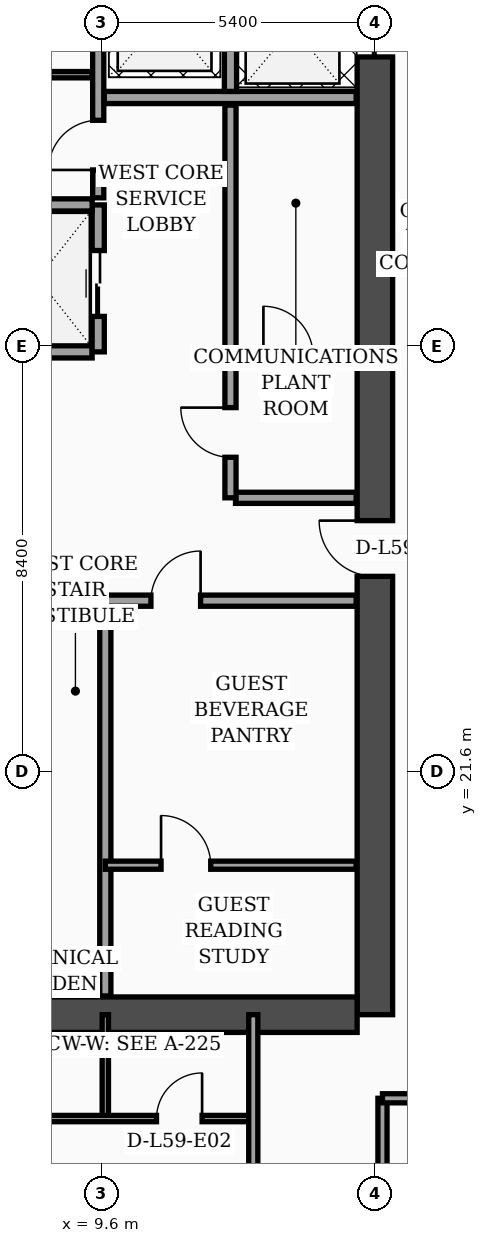
"""IFC4 building model, lengths in metres.
Left out: names, types, materials, properties, quantities, classifications, styles, units other than length and angle.
Written with IfcOpenShell. Run it as: python <this file> out.ifc"""

import sys

from ifc_helpers import new_model, si_unit, direction, frame, frame_2d, origin, place, context, subcontext, project, spatial, rectangle, extrude, element, fill, save


model = new_model("IFC4")
c1 = context("Model", 3, precision=1e-05, world=origin(), true_north=direction((0.0, 1.0)))
c2 = subcontext(c1, "Body", "Model", "MODEL_VIEW")
j1 = project(units=[si_unit("LENGTHUNIT", "METRE"), si_unit("PLANEANGLEUNIT", "RADIAN")], contexts=[c1])
p1 = place(None, origin())
s1 = spatial("IfcSite", under=j1, at=p1, CompositionType="ELEMENT")
p2 = place(p1, origin())
s2 = spatial("IfcBuilding", under=s1, at=p2, CompositionType="ELEMENT")
p3 = place(p2, frame((0.0, 0.0, 239.3)))
s3 = spatial("IfcBuildingStorey", under=s2, at=p3, CompositionType="ELEMENT", Elevation=239.3)
p4 = place(p3, frame((15.0, 16.8, 0.0), z_axis=(0.0, 0.0, 1.0), x_axis=(0.0, 1.0, 0.0)))
e1 = element("IfcWall", 1, at=p4, inside=s3, PredefinedType="SHEAR", context=c2, shape_type="SweptSolid", body=[
    extrude(rectangle(XDim=21.6, YDim=0.7, at=frame_2d((10.8, 0.0))), origin(), (0.0, 0.0, 1.0), 4.05),
])
p5 = place(p4, frame((8.65, 0.0, 0.0)))
e2 = element("IfcOpeningElement", 2, at=p5, cuts=e1, PredefinedType="OPENING", context=c2, shape_type="SweptSolid", body=[
    extrude(rectangle(XDim=1.1, YDim=2.2, at=frame_2d((0.55, 1.1))), frame((0.0, 0.36, 0.0), z_axis=(0.0, -1.0, 0.0), x_axis=(1.0, 0.0, 0.0)), (0.0, 0.0, 1.0), 0.72),
])
p6 = place(p4, frame((18.9, 0.0, 0.0)))
e3 = element("IfcOpeningElement", 3, at=p6, cuts=e1, PredefinedType="OPENING", context=c2, shape_type="SweptSolid", body=[
    extrude(rectangle(XDim=1.1, YDim=2.2, at=frame_2d((0.55, 1.1))), frame((0.0, 0.36, 0.0), z_axis=(0.0, -1.0, 0.0), x_axis=(1.0, 0.0, 0.0)), (0.0, 0.0, 1.0), 0.72),
])
p7 = place(p3, frame((4.55, 16.8, 0.0), z_axis=(0.0, 0.0, 1.0), x_axis=(1.0, 0.0, 0.0)))
e4 = element("IfcWall", 4, at=p7, inside=s3, PredefinedType="SHEAR", context=c2, shape_type="SweptSolid", body=[
    extrude(rectangle(XDim=10.1, YDim=0.7, at=frame_2d((5.05, 0.0))), origin(), (0.0, 0.0, 1.0), 4.05),
])
p8 = place(p3, frame((4.57, 29.88, 0.0), z_axis=(0.0, 0.0, 1.0), x_axis=(1.0, 0.0, 0.0)))
e5 = element("IfcWall", 5, at=p8, inside=s3, PredefinedType="SOLIDWALL", context=c2, shape_type="SweptSolid", body=[
    extrude(rectangle(XDim=4.85, YDim=0.24, at=frame_2d((2.425, 0.0))), origin(), (0.0, 0.0, 1.0), 4.05),
])
p9 = place(p8, frame((0.45, 0.0, 0.0)))
e6 = element("IfcOpeningElement", 6, at=p9, cuts=e5, PredefinedType="OPENING", context=c2, shape_type="SweptSolid", body=[
    extrude(rectangle(XDim=1.3, YDim=2.35, at=frame_2d((0.65, 1.175))), frame((0.0, 0.13, 0.0), z_axis=(0.0, -1.0, 0.0), x_axis=(1.0, 0.0, 0.0)), (0.0, 0.0, 1.0), 0.26),
])
p10 = place(p3, frame((9.54, 29.88, 0.0), z_axis=(0.0, 0.0, 1.0), x_axis=(0.0, 1.0, 0.0)))
e7 = element("IfcWall", 7, at=p10, inside=s3, PredefinedType="SOLIDWALL", context=c2, shape_type="SweptSolid", body=[
    extrude(rectangle(XDim=2.9, YDim=0.24, at=frame_2d((1.45, 0.0))), origin(), (0.0, 0.0, 1.0), 4.05),
])
p11 = place(p10, frame((0.7, 0.0, 0.0)))
e8 = element("IfcOpeningElement", 8, at=p11, cuts=e7, PredefinedType="OPENING", context=c2, shape_type="SweptSolid", body=[
    extrude(rectangle(XDim=1.3, YDim=2.35, at=frame_2d((0.65, 1.175))), frame((0.0, 0.13, 0.0), z_axis=(0.0, -1.0, 0.0), x_axis=(1.0, 0.0, 0.0)), (0.0, 0.0, 1.0), 0.26),
])
p12 = place(p3, frame((4.57, 32.78, 0.0), z_axis=(0.0, 0.0, 1.0), x_axis=(1.0, 0.0, 0.0)))
e9 = element("IfcWall", 9, at=p12, inside=s3, PredefinedType="SOLIDWALL", context=c2, shape_type="SweptSolid", body=[
    extrude(rectangle(XDim=4.85, YDim=0.24, at=frame_2d((2.425, 0.0))), origin(), (0.0, 0.0, 1.0), 3.7),
])
p13 = place(p3, frame((9.68, 17.17, 0.0), z_axis=(0.0, 0.0, 1.0), x_axis=(0.0, 1.0, 0.0)))
e10 = element("IfcWall", 10, at=p13, inside=s3, PredefinedType="SOLIDWALL", context=c2, shape_type="SweptSolid", body=[
    extrude(rectangle(XDim=7.83, YDim=0.22, at=frame_2d((3.915, 0.0))), origin(), (0.0, 0.0, 1.0), 4.05),
])
p14 = place(p3, frame((7.05, 35.35, 0.0), z_axis=(0.0, 0.0, 1.0), x_axis=(1.0, 0.0, 0.0)))
e11 = element("IfcWall", 11, at=p14, inside=s3, PredefinedType="PARTITIONING", context=c2, shape_type="SweptSolid", body=[
    extrude(rectangle(XDim=2.37, YDim=0.125, at=frame_2d((1.185, 0.0))), origin(), (0.0, 0.0, 1.0), 4.05),
])
p15 = place(p14, frame((0.55, 0.0, 0.0)))
e12 = element("IfcOpeningElement", 12, at=p15, cuts=e11, PredefinedType="OPENING", context=c2, shape_type="SweptSolid", body=[
    extrude(rectangle(XDim=0.98, YDim=2.15, at=frame_2d((0.49, 1.075))), frame((0.0, 0.073, 0.0), z_axis=(0.0, -1.0, 0.0), x_axis=(1.0, 0.0, 0.0)), (0.0, 0.0, 1.0), 0.145),
])
p16 = place(p3, frame((9.54, 32.92, 0.0), z_axis=(0.0, 0.0, 1.0), x_axis=(0.0, 1.0, 0.0)))
e13 = element("IfcWall", 13, at=p16, inside=s3, PredefinedType="SOLIDWALL", context=c2, shape_type="SweptSolid", body=[
    extrude(rectangle(XDim=5.11, YDim=0.22, at=frame_2d((2.555, 0.0))), origin(), (0.0, 0.0, 1.0), 4.05),
])
p17 = place(p16, frame((0.55, 0.0, 0.0)))
e14 = element("IfcOpeningElement", 14, at=p17, cuts=e13, PredefinedType="OPENING", context=c2, shape_type="SweptSolid", body=[
    extrude(rectangle(XDim=0.98, YDim=2.15, at=frame_2d((0.49, 1.075))), frame((0.0, 0.12, 0.0), z_axis=(0.0, -1.0, 0.0), x_axis=(1.0, 0.0, 0.0)), (0.0, 0.0, 1.0), 0.24),
])
p18 = place(p3, frame((9.68, 19.75, 0.0), z_axis=(0.0, 0.0, 1.0), x_axis=(1.0, 0.0, 0.0)))
e15 = element("IfcWall", 15, at=p18, inside=s3, PredefinedType="PARTITIONING", context=c2, shape_type="SweptSolid", body=[
    extrude(rectangle(XDim=4.95, YDim=0.16, at=frame_2d((2.475, 0.0))), origin(), (0.0, 0.0, 1.0), 4.05),
])
p19 = place(p18, frame((1.1, 0.0, 0.0)))
e16 = element("IfcOpeningElement", 16, at=p19, cuts=e15, PredefinedType="OPENING", context=c2, shape_type="SweptSolid", body=[
    extrude(rectangle(XDim=0.98, YDim=2.15, at=frame_2d((0.49, 1.075))), frame((0.0, 0.09, 0.0), z_axis=(0.0, -1.0, 0.0), x_axis=(1.0, 0.0, 0.0)), (0.0, 0.0, 1.0), 0.18),
])
p20 = place(p3, frame((9.68, 24.97, 0.0), z_axis=(0.0, 0.0, 1.0), x_axis=(1.0, 0.0, 0.0)))
e17 = element("IfcWall", 17, at=p20, inside=s3, PredefinedType="SOLIDWALL", context=c2, shape_type="SweptSolid", body=[
    extrude(rectangle(XDim=4.95, YDim=0.22, at=frame_2d((2.475, 0.0))), origin(), (0.0, 0.0, 1.0), 3.5),
])
p21 = place(p20, frame((0.9, 0.0, 0.0)))
e18 = element("IfcOpeningElement", 18, at=p21, cuts=e17, PredefinedType="OPENING", context=c2, shape_type="SweptSolid", body=[
    extrude(rectangle(XDim=0.98, YDim=2.15, at=frame_2d((0.49, 1.075))), frame((0.0, 0.12, 0.0), z_axis=(0.0, -1.0, 0.0), x_axis=(1.0, 0.0, 0.0)), (0.0, 0.0, 1.0), 0.24),
])
p22 = place(p3, frame((12.25, 27.0, 0.0), z_axis=(0.0, 0.0, 1.0), x_axis=(1.0, 0.0, 0.0)))
e19 = element("IfcWall", 19, at=p22, inside=s3, PredefinedType="SOLIDWALL", context=c2, shape_type="SweptSolid", body=[
    extrude(rectangle(XDim=2.38, YDim=0.22, at=frame_2d((1.19, 0.0))), origin(), (0.0, 0.0, 1.0), 4.05),
])
p23 = place(p3, frame((12.15, 27.0, 0.0), z_axis=(0.0, 0.0, 1.0), x_axis=(0.0, 1.0, 0.0)))
e20 = element("IfcWall", 20, at=p23, inside=s3, PredefinedType="SOLIDWALL", context=c2, shape_type="SweptSolid", body=[
    extrude(rectangle(XDim=7.75, YDim=0.22, at=frame_2d((3.875, 0.0))), origin(), (0.0, 0.0, 1.0), 4.05),
])
p24 = place(p23, frame((0.8, 0.0, 0.0)))
e21 = element("IfcOpeningElement", 21, at=p24, cuts=e20, PredefinedType="OPENING", context=c2, shape_type="SweptSolid", body=[
    extrude(rectangle(XDim=0.98, YDim=2.15, at=frame_2d((0.49, 1.075))), frame((0.0, 0.12, 0.0), z_axis=(0.0, -1.0, 0.0), x_axis=(1.0, 0.0, 0.0)), (0.0, 0.0, 1.0), 0.24),
])
p25 = place(p3, frame((12.25, 29.8, 0.0), z_axis=(0.0, 0.0, 1.0), x_axis=(1.0, 0.0, 0.0)))
e22 = element("IfcWall", 22, at=p25, inside=s3, PredefinedType="PARTITIONING", context=c2, shape_type="SweptSolid", body=[
    extrude(rectangle(XDim=2.38, YDim=0.16, at=frame_2d((1.19, 0.0))), origin(), (0.0, 0.0, 1.0), 4.05),
])
p26 = place(p25, frame((0.55, 0.0, 0.0)))
e23 = element("IfcOpeningElement", 23, at=p26, cuts=e22, PredefinedType="OPENING", context=c2, shape_type="SweptSolid", body=[
    extrude(rectangle(XDim=0.98, YDim=2.15, at=frame_2d((0.49, 1.075))), frame((0.0, 0.09, 0.0), z_axis=(0.0, -1.0, 0.0), x_axis=(1.0, 0.0, 0.0)), (0.0, 0.0, 1.0), 0.18),
])
p27 = place(p3, frame((9.66, 34.9, 0.0), z_axis=(0.0, 0.0, 1.0), x_axis=(1.0, 0.0, 0.0)))
e24 = element("IfcWall", 24, at=p27, inside=s3, PredefinedType="SOLIDWALL", context=c2, shape_type="SweptSolid", body=[
    extrude(rectangle(XDim=4.97, YDim=0.24, at=frame_2d((2.485, 0.0))), origin(), (0.0, 0.0, 1.0), 4.05),
])
p28 = place(p3, frame((12.15, 35.02, 0.0), z_axis=(0.0, 0.0, 1.0), x_axis=(0.0, 1.0, 0.0)))
e25 = element("IfcWall", 25, at=p28, inside=s3, PredefinedType="SOLIDWALL", context=c2, shape_type="SweptSolid", body=[
    extrude(rectangle(XDim=3.01, YDim=0.24, at=frame_2d((1.505, 0.0))), origin(), (0.0, 0.0, 1.0), 4.05),
])
p29 = place(p3, frame((9.68, 14.75, 0.0), z_axis=(0.0, 0.0, 1.0), x_axis=(0.0, 1.0, 0.0)))
e26 = element("IfcWall", 26, at=p29, inside=s3, PredefinedType="PARTITIONING", context=c2, shape_type="SweptSolid", body=[
    extrude(rectangle(XDim=2.05, YDim=0.125, at=frame_2d((1.025, 0.0))), origin(), (0.0, 0.0, 1.0), 4.05),
])
p30 = place(p3, frame((0.08, 14.75, 0.0), z_axis=(0.0, 0.0, 1.0), x_axis=(1.0, 0.0, 0.0)))
e27 = element("IfcWall", 27, at=p30, inside=s3, PredefinedType="PARTITIONING", context=c2, shape_type="SweptSolid", body=[
    extrude(rectangle(XDim=12.52, YDim=0.125, at=frame_2d((6.26, 0.0))), origin(), (0.0, 0.0, 1.0), 3.5),
])
p31 = place(p30, frame((4.32, 0.0, 0.0)))
e28 = element("IfcOpeningElement", 28, at=p31, cuts=e27, PredefinedType="OPENING", context=c2, shape_type="SweptSolid", body=[
    extrude(rectangle(XDim=0.96, YDim=2.2, at=frame_2d((0.48, 1.1))), frame((0.0, 0.073, 0.0), z_axis=(0.0, -1.0, 0.0), x_axis=(1.0, 0.0, 0.0)), (0.0, 0.0, 1.0), 0.145),
])
p32 = place(p30, frame((10.61, 0.0, 0.0)))
e29 = element("IfcOpeningElement", 29, at=p32, cuts=e27, PredefinedType="OPENING", context=c2, shape_type="SweptSolid", body=[
    extrude(rectangle(XDim=0.9, YDim=2.15, at=frame_2d((0.45, 1.075))), frame((0.0, 0.073, 0.0), z_axis=(0.0, -1.0, 0.0), x_axis=(1.0, 0.0, 0.0)), (0.0, 0.0, 1.0), 0.145),
])
p33 = place(p3, frame((12.6, 2.44, 0.0), z_axis=(0.0, 0.0, 1.0), x_axis=(0.0, 1.0, 0.0)))
e30 = element("IfcWall", 30, at=p33, inside=s3, PredefinedType="PARTITIONING", context=c2, shape_type="SweptSolid", body=[
    extrude(rectangle(XDim=14.36, YDim=0.18, at=frame_2d((7.18, 0.0))), origin(), (0.0, 0.0, 1.0), 2.35),
])
p34 = place(p33, frame((3.01, 0.0, 0.0)))
e31 = element("IfcOpeningElement", 31, at=p34, cuts=e30, PredefinedType="OPENING", context=c2, shape_type="SweptSolid", body=[
    extrude(rectangle(XDim=1.02, YDim=2.2, at=frame_2d((0.51, 1.1))), frame((0.0, 0.1, 0.0), z_axis=(0.0, -1.0, 0.0), x_axis=(1.0, 0.0, 0.0)), (0.0, 0.0, 1.0), 0.2),
])
p35 = place(p33, frame((9.35, 0.0, 0.0)))
e32 = element("IfcOpeningElement", 32, at=p35, cuts=e30, PredefinedType="OPENING", context=c2, shape_type="SweptSolid", body=[
    extrude(rectangle(XDim=1.02, YDim=2.2, at=frame_2d((0.51, 1.1))), frame((0.0, 0.1, 0.0), z_axis=(0.0, -1.0, 0.0), x_axis=(1.0, 0.0, 0.0)), (0.0, 0.0, 1.0), 0.2),
])
p36 = place(p3, frame((15.15, 2.44, 0.0), z_axis=(0.0, 0.0, 1.0), x_axis=(0.0, 1.0, 0.0)))
e33 = element("IfcWall", 33, at=p36, inside=s3, PredefinedType="PARTITIONING", context=c2, shape_type="SweptSolid", body=[
    extrude(rectangle(XDim=12.71, YDim=0.18, at=frame_2d((6.355, 0.0))), origin(), (0.0, 0.0, 1.0), 2.35),
])
p37 = place(p3, frame((15.15, 15.15, 0.0), z_axis=(0.0, 0.0, 1.0), x_axis=(1.0, 0.0, 0.0)))
e34 = element("IfcWall", 34, at=p37, inside=s3, PredefinedType="PARTITIONING", context=c2, shape_type="SweptSolid", body=[
    extrude(rectangle(XDim=6.45, YDim=0.18, at=frame_2d((3.225, 0.0))), origin(), (0.0, 0.0, 1.0), 2.35),
])
p38 = place(p37, frame((1.74, 0.0, 0.0)))
e35 = element("IfcOpeningElement", 35, at=p38, cuts=e34, PredefinedType="OPENING", context=c2, shape_type="SweptSolid", body=[
    extrude(rectangle(XDim=1.02, YDim=2.2, at=frame_2d((0.51, 1.1))), frame((0.0, 0.1, 0.0), z_axis=(0.0, -1.0, 0.0), x_axis=(1.0, 0.0, 0.0)), (0.0, 0.0, 1.0), 0.2),
])
p39 = place(p11, origin())
e36 = element("IfcDoor", 36, at=p39, inside=s3, OperationType="DOUBLE_DOOR_SLIDING", PredefinedType="DOOR", context=c2, shape_type="SweptSolid", body=[
    extrude(rectangle(XDim=1.3, YDim=2.35, at=frame_2d((0.65, 1.175))), frame((0.0, 0.025, 0.0), z_axis=(0.0, -1.0, 0.0), x_axis=(1.0, 0.0, 0.0)), (0.0, 0.0, 1.0), 0.05),
])
fill(e8, e36)
p40 = place(p17, origin())
e37 = element("IfcDoor", 37, at=p40, inside=s3, OperationType="SINGLE_SWING_LEFT", PredefinedType="DOOR", context=c2, shape_type="SweptSolid", body=[
    extrude(rectangle(XDim=0.98, YDim=2.15, at=frame_2d((0.49, 1.075))), frame((0.0, 0.025, 0.0), z_axis=(0.0, -1.0, 0.0), x_axis=(1.0, 0.0, 0.0)), (0.0, 0.0, 1.0), 0.05),
])
fill(e14, e37)
p41 = place(p19, origin())
e38 = element("IfcDoor", 38, at=p41, inside=s3, OperationType="SINGLE_SWING_LEFT", PredefinedType="DOOR", context=c2, shape_type="SweptSolid", body=[
    extrude(rectangle(XDim=0.98, YDim=2.15, at=frame_2d((0.49, 1.075))), frame((0.0, 0.025, 0.0), z_axis=(0.0, -1.0, 0.0), x_axis=(1.0, 0.0, 0.0)), (0.0, 0.0, 1.0), 0.05),
])
fill(e16, e38)
p42 = place(p21, origin())
e39 = element("IfcDoor", 39, at=p42, inside=s3, OperationType="SINGLE_SWING_RIGHT", PredefinedType="DOOR", context=c2, shape_type="SweptSolid", body=[
    extrude(rectangle(XDim=0.98, YDim=2.15, at=frame_2d((0.49, 1.075))), frame((0.0, 0.025, 0.0), z_axis=(0.0, -1.0, 0.0), x_axis=(1.0, 0.0, 0.0)), (0.0, 0.0, 1.0), 0.05),
])
fill(e18, e39)
p43 = place(p24, origin())
e40 = element("IfcDoor", 40, at=p43, inside=s3, OperationType="SINGLE_SWING_RIGHT", PredefinedType="DOOR", context=c2, shape_type="SweptSolid", body=[
    extrude(rectangle(XDim=0.98, YDim=2.15, at=frame_2d((0.49, 1.075))), frame((0.0, 0.025, 0.0), z_axis=(0.0, -1.0, 0.0), x_axis=(1.0, 0.0, 0.0)), (0.0, 0.0, 1.0), 0.05),
])
fill(e21, e40)
p44 = place(p26, origin())
e41 = element("IfcDoor", 41, at=p44, inside=s3, OperationType="SINGLE_SWING_LEFT", PredefinedType="DOOR", context=c2, shape_type="SweptSolid", body=[
    extrude(rectangle(XDim=0.98, YDim=2.15, at=frame_2d((0.49, 1.075))), frame((0.0, 0.025, 0.0), z_axis=(0.0, -1.0, 0.0), x_axis=(1.0, 0.0, 0.0)), (0.0, 0.0, 1.0), 0.05),
])
fill(e23, e41)
p45 = place(p32, origin())
e42 = element("IfcDoor", 42, at=p45, inside=s3, OperationType="SINGLE_SWING_RIGHT", PredefinedType="DOOR", context=c2, shape_type="SweptSolid", body=[
    extrude(rectangle(XDim=0.9, YDim=2.15, at=frame_2d((0.45, 1.075))), frame((0.0, 0.025, 0.0), z_axis=(0.0, -1.0, 0.0), x_axis=(1.0, 0.0, 0.0)), (0.0, 0.0, 1.0), 0.05),
])
fill(e29, e42)
p46 = place(p5, origin())
e43 = element("IfcDoor", 43, at=p46, inside=s3, OperationType="SINGLE_SWING_RIGHT", PredefinedType="DOOR", context=c2, shape_type="SweptSolid", body=[
    extrude(rectangle(XDim=1.1, YDim=2.2, at=frame_2d((0.55, 1.1))), frame((0.0, 0.025, 0.0), z_axis=(0.0, -1.0, 0.0), x_axis=(1.0, 0.0, 0.0)), (0.0, 0.0, 1.0), 0.05),
])
fill(e2, e43)
p47 = place(p6, origin())
e44 = element("IfcDoor", 44, at=p47, inside=s3, OperationType="DOUBLE_DOOR_SLIDING", PredefinedType="DOOR", context=c2, shape_type="SweptSolid", body=[
    extrude(rectangle(XDim=1.1, YDim=2.2, at=frame_2d((0.55, 1.1))), frame((0.0, 0.025, 0.0), z_axis=(0.0, -1.0, 0.0), x_axis=(1.0, 0.0, 0.0)), (0.0, 0.0, 1.0), 0.05),
])
fill(e3, e44)
save(model, sys.argv[1])
